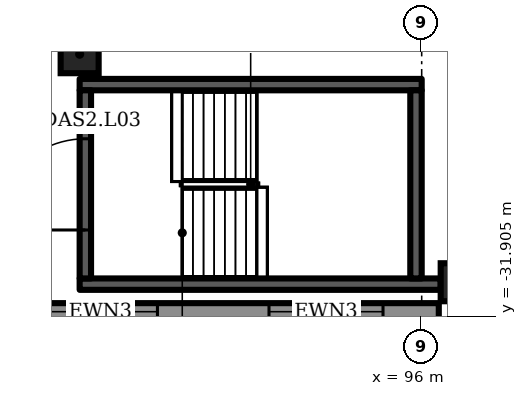
"""IFC4 building model, lengths in metres.
Left out: names, types, materials, properties, quantities, classifications, styles, units other than length and angle.
Written with IfcOpenShell. Run it as: python <this file> out.ifc"""

import sys

from ifc_helpers import new_model, si_unit, direction, frame, frame_2d, origin, origin_2d, place, context, subcontext, project, spatial, rectangle, extrude, element, fill, save


model = new_model("IFC4")
c1 = context("Model", 3, precision=1e-05, world=origin(), true_north=direction((0.0, 1.0)))
c2 = subcontext(c1, "Body", "Model", "MODEL_VIEW")
j1 = project(units=[si_unit("LENGTHUNIT", "METRE"), si_unit("PLANEANGLEUNIT", "RADIAN")], contexts=[c1])
p1 = place(None, origin())
s1 = spatial("IfcSite", under=j1, at=p1, CompositionType="ELEMENT")
p2 = place(p1, origin())
s2 = spatial("IfcBuilding", under=s1, at=p2, CompositionType="ELEMENT")
p3 = place(p2, frame((0.0, 0.0, 21.5)))
s3 = spatial("IfcBuildingStorey", under=s2, at=p3, CompositionType="ELEMENT", Elevation=21.5)
for number, where, z_axis, x_axis in (
    (1, (97.0, -31.0, 0.0), (0.0, 0.0, 1.0), (1.0, 0.0, 0.0)),
    (2, (87.0, -25.0, 0.0), (0.0, 0.0, 1.0), (1.0, 0.0, 0.0)),
):
    element("IfcColumn", number, at=place(p3, frame(where, z_axis=z_axis, x_axis=x_axis)), inside=s3, PredefinedType="COLUMN", context=c2, shape_type="SweptSolid", body=[
        extrude(rectangle(XDim=1.0, YDim=1.0, at=origin_2d()), origin(), (0.0, 0.0, 1.0), 6.0),
    ])
p4 = place(p3, frame((-4.45, -31.775, 0.0), z_axis=(0.0, 0.0, 1.0), x_axis=(1.0, 0.0, 0.0)))
e3 = element("IfcWall", 3, at=p4, inside=s3, PredefinedType="SOLIDWALL", context=c2, shape_type="SweptSolid", body=[
    extrude(rectangle(XDim=100.9, YDim=0.45, at=frame_2d((50.45, 0.0))), origin(), (0.0, 0.0, 1.0), 5.7),
])
p5 = place(p4, frame((1.468, 0.0, 1.0)))
e4 = element("IfcOpeningElement", 4, at=p5, cuts=e3, PredefinedType="OPENING", context=c2, shape_type="SweptSolid", body=[
    extrude(rectangle(XDim=3.0, YDim=3.7, at=frame_2d((1.5, 1.85))), frame((0.0, 0.235, 0.0), z_axis=(0.0, -1.0, 0.0), x_axis=(1.0, 0.0, 0.0)), (0.0, 0.0, 1.0), 0.47),
])
p6 = place(p4, frame((7.403, 0.0, 1.0)))
e5 = element("IfcOpeningElement", 5, at=p6, cuts=e3, PredefinedType="OPENING", context=c2, shape_type="SweptSolid", body=[
    extrude(rectangle(XDim=3.0, YDim=3.7, at=frame_2d((1.5, 1.85))), frame((0.0, 0.235, 0.0), z_axis=(0.0, -1.0, 0.0), x_axis=(1.0, 0.0, 0.0)), (0.0, 0.0, 1.0), 0.47),
])
p7 = place(p4, frame((13.338, 0.0, 1.0)))
e6 = element("IfcOpeningElement", 6, at=p7, cuts=e3, PredefinedType="OPENING", context=c2, shape_type="SweptSolid", body=[
    extrude(rectangle(XDim=3.0, YDim=3.7, at=frame_2d((1.5, 1.85))), frame((0.0, 0.235, 0.0), z_axis=(0.0, -1.0, 0.0), x_axis=(1.0, 0.0, 0.0)), (0.0, 0.0, 1.0), 0.47),
])
p8 = place(p4, frame((19.273, 0.0, 1.0)))
e7 = element("IfcOpeningElement", 7, at=p8, cuts=e3, PredefinedType="OPENING", context=c2, shape_type="SweptSolid", body=[
    extrude(rectangle(XDim=3.0, YDim=3.7, at=frame_2d((1.5, 1.85))), frame((0.0, 0.235, 0.0), z_axis=(0.0, -1.0, 0.0), x_axis=(1.0, 0.0, 0.0)), (0.0, 0.0, 1.0), 0.47),
])
p9 = place(p4, frame((25.209, 0.0, 1.0)))
e8 = element("IfcOpeningElement", 8, at=p9, cuts=e3, PredefinedType="OPENING", context=c2, shape_type="SweptSolid", body=[
    extrude(rectangle(XDim=3.0, YDim=3.7, at=frame_2d((1.5, 1.85))), frame((0.0, 0.235, 0.0), z_axis=(0.0, -1.0, 0.0), x_axis=(1.0, 0.0, 0.0)), (0.0, 0.0, 1.0), 0.47),
])
p10 = place(p4, frame((31.144, 0.0, 1.0)))
e9 = element("IfcOpeningElement", 9, at=p10, cuts=e3, PredefinedType="OPENING", context=c2, shape_type="SweptSolid", body=[
    extrude(rectangle(XDim=3.0, YDim=3.7, at=frame_2d((1.5, 1.85))), frame((0.0, 0.235, 0.0), z_axis=(0.0, -1.0, 0.0), x_axis=(1.0, 0.0, 0.0)), (0.0, 0.0, 1.0), 0.47),
])
p11 = place(p4, frame((37.079, 0.0, 1.0)))
e10 = element("IfcOpeningElement", 10, at=p11, cuts=e3, PredefinedType="OPENING", context=c2, shape_type="SweptSolid", body=[
    extrude(rectangle(XDim=3.0, YDim=3.7, at=frame_2d((1.5, 1.85))), frame((0.0, 0.235, 0.0), z_axis=(0.0, -1.0, 0.0), x_axis=(1.0, 0.0, 0.0)), (0.0, 0.0, 1.0), 0.47),
])
p12 = place(p4, frame((43.015, 0.0, 1.0)))
e11 = element("IfcOpeningElement", 11, at=p12, cuts=e3, PredefinedType="OPENING", context=c2, shape_type="SweptSolid", body=[
    extrude(rectangle(XDim=3.0, YDim=3.7, at=frame_2d((1.5, 1.85))), frame((0.0, 0.235, 0.0), z_axis=(0.0, -1.0, 0.0), x_axis=(1.0, 0.0, 0.0)), (0.0, 0.0, 1.0), 0.47),
])
p13 = place(p4, frame((48.95, 0.0, 1.0)))
e12 = element("IfcOpeningElement", 12, at=p13, cuts=e3, PredefinedType="OPENING", context=c2, shape_type="SweptSolid", body=[
    extrude(rectangle(XDim=3.0, YDim=3.7, at=frame_2d((1.5, 1.85))), frame((0.0, 0.235, 0.0), z_axis=(0.0, -1.0, 0.0), x_axis=(1.0, 0.0, 0.0)), (0.0, 0.0, 1.0), 0.47),
])
p14 = place(p4, frame((54.885, 0.0, 1.0)))
e13 = element("IfcOpeningElement", 13, at=p14, cuts=e3, PredefinedType="OPENING", context=c2, shape_type="SweptSolid", body=[
    extrude(rectangle(XDim=3.0, YDim=3.7, at=frame_2d((1.5, 1.85))), frame((0.0, 0.235, 0.0), z_axis=(0.0, -1.0, 0.0), x_axis=(1.0, 0.0, 0.0)), (0.0, 0.0, 1.0), 0.47),
])
p15 = place(p4, frame((60.821, 0.0, 1.0)))
e14 = element("IfcOpeningElement", 14, at=p15, cuts=e3, PredefinedType="OPENING", context=c2, shape_type="SweptSolid", body=[
    extrude(rectangle(XDim=3.0, YDim=3.7, at=frame_2d((1.5, 1.85))), frame((0.0, 0.235, 0.0), z_axis=(0.0, -1.0, 0.0), x_axis=(1.0, 0.0, 0.0)), (0.0, 0.0, 1.0), 0.47),
])
p16 = place(p4, frame((66.756, 0.0, 1.0)))
e15 = element("IfcOpeningElement", 15, at=p16, cuts=e3, PredefinedType="OPENING", context=c2, shape_type="SweptSolid", body=[
    extrude(rectangle(XDim=3.0, YDim=3.7, at=frame_2d((1.5, 1.85))), frame((0.0, 0.235, 0.0), z_axis=(0.0, -1.0, 0.0), x_axis=(1.0, 0.0, 0.0)), (0.0, 0.0, 1.0), 0.47),
])
p17 = place(p4, frame((72.691, 0.0, 1.0)))
e16 = element("IfcOpeningElement", 16, at=p17, cuts=e3, PredefinedType="OPENING", context=c2, shape_type="SweptSolid", body=[
    extrude(rectangle(XDim=3.0, YDim=3.7, at=frame_2d((1.5, 1.85))), frame((0.0, 0.235, 0.0), z_axis=(0.0, -1.0, 0.0), x_axis=(1.0, 0.0, 0.0)), (0.0, 0.0, 1.0), 0.47),
])
p18 = place(p4, frame((78.626, 0.0, 1.0)))
e17 = element("IfcOpeningElement", 17, at=p18, cuts=e3, PredefinedType="OPENING", context=c2, shape_type="SweptSolid", body=[
    extrude(rectangle(XDim=3.0, YDim=3.7, at=frame_2d((1.5, 1.85))), frame((0.0, 0.235, 0.0), z_axis=(0.0, -1.0, 0.0), x_axis=(1.0, 0.0, 0.0)), (0.0, 0.0, 1.0), 0.47),
])
p19 = place(p4, frame((84.562, 0.0, 1.0)))
e18 = element("IfcOpeningElement", 18, at=p19, cuts=e3, PredefinedType="OPENING", context=c2, shape_type="SweptSolid", body=[
    extrude(rectangle(XDim=3.0, YDim=3.7, at=frame_2d((1.5, 1.85))), frame((0.0, 0.235, 0.0), z_axis=(0.0, -1.0, 0.0), x_axis=(1.0, 0.0, 0.0)), (0.0, 0.0, 1.0), 0.47),
])
p20 = place(p4, frame((90.497, 0.0, 1.0)))
e19 = element("IfcOpeningElement", 19, at=p20, cuts=e3, PredefinedType="OPENING", context=c2, shape_type="SweptSolid", body=[
    extrude(rectangle(XDim=3.0, YDim=3.7, at=frame_2d((1.5, 1.85))), frame((0.0, 0.235, 0.0), z_axis=(0.0, -1.0, 0.0), x_axis=(1.0, 0.0, 0.0)), (0.0, 0.0, 1.0), 0.47),
])
p21 = place(p4, frame((96.432, 0.0, 1.0)))
e20 = element("IfcOpeningElement", 20, at=p21, cuts=e3, PredefinedType="OPENING", context=c2, shape_type="SweptSolid", body=[
    extrude(rectangle(XDim=3.0, YDim=3.7, at=frame_2d((1.5, 1.85))), frame((0.0, 0.235, 0.0), z_axis=(0.0, -1.0, 0.0), x_axis=(1.0, 0.0, 0.0)), (0.0, 0.0, 1.0), 0.47),
])
p22 = place(p3, frame((87.0, -31.05, 0.0), z_axis=(0.0, 0.0, 1.0), x_axis=(1.0, 0.0, 0.0)))
e21 = element("IfcWall", 21, at=p22, inside=s3, PredefinedType="SHEAR", context=c2, shape_type="SweptSolid", body=[
    extrude(rectangle(XDim=9.5, YDim=0.3, at=frame_2d((4.75, 0.0))), origin(), (0.0, 0.0, 1.0), 5.7),
])
p23 = place(p3, frame((87.0, -25.8, 0.0), z_axis=(0.0, 0.0, 1.0), x_axis=(1.0, 0.0, 0.0)))
e22 = element("IfcWall", 22, at=p23, inside=s3, PredefinedType="SHEAR", context=c2, shape_type="SweptSolid", body=[
    extrude(rectangle(XDim=9.0, YDim=0.3, at=frame_2d((4.5, 0.0))), origin(), (0.0, 0.0, 1.0), 5.7),
])
p24 = place(p3, frame((87.15, -30.9, 0.0), z_axis=(0.0, 0.0, 1.0), x_axis=(0.0, 1.0, 0.0)))
e23 = element("IfcWall", 23, at=p24, inside=s3, PredefinedType="SHEAR", context=c2, shape_type="SweptSolid", body=[
    extrude(rectangle(XDim=4.95, YDim=0.3, at=frame_2d((2.475, 0.0))), origin(), (0.0, 0.0, 1.0), 5.7),
])
p25 = place(p24, frame((1.275, 0.0, 0.0)))
e24 = element("IfcOpeningElement", 24, at=p25, cuts=e23, PredefinedType="OPENING", context=c2, shape_type="SweptSolid", body=[
    extrude(rectangle(XDim=2.4, YDim=2.1, at=frame_2d((1.2, 1.05))), frame((0.0, 0.16, 0.0), z_axis=(0.0, -1.0, 0.0), x_axis=(1.0, 0.0, 0.0)), (0.0, 0.0, 1.0), 0.32),
])
p26 = place(p3, frame((95.85, -30.9, 0.0), z_axis=(0.0, 0.0, 1.0), x_axis=(0.0, 1.0, 0.0)))
e25 = element("IfcWall", 25, at=p26, inside=s3, PredefinedType="SHEAR", context=c2, shape_type="SweptSolid", body=[
    extrude(rectangle(XDim=4.95, YDim=0.3, at=frame_2d((2.475, 0.0))), origin(), (0.0, 0.0, 1.0), 5.7),
])
p27 = place(p20, origin())
e26 = element("IfcWindow", 26, at=p27, inside=s3, PartitioningType="SINGLE_PANEL", PredefinedType="WINDOW", context=c2, shape_type="SweptSolid", body=[
    extrude(rectangle(XDim=3.0, YDim=3.7, at=frame_2d((1.5, 1.85))), frame((0.0, 0.105, 0.0), z_axis=(0.0, -1.0, 0.0), x_axis=(1.0, 0.0, 0.0)), (0.0, 0.0, 1.0), 0.06),
])
fill(e19, e26)
p28 = place(p21, origin())
e27 = element("IfcWindow", 27, at=p28, inside=s3, PartitioningType="SINGLE_PANEL", PredefinedType="WINDOW", context=c2, shape_type="SweptSolid", body=[
    extrude(rectangle(XDim=3.0, YDim=3.7, at=frame_2d((1.5, 1.85))), frame((0.0, 0.105, 0.0), z_axis=(0.0, -1.0, 0.0), x_axis=(1.0, 0.0, 0.0)), (0.0, 0.0, 1.0), 0.06),
])
fill(e20, e27)
p29 = place(p25, origin())
e28 = element("IfcDoor", 28, at=p29, inside=s3, OperationType="DOUBLE_DOOR_SINGLE_SWING", PredefinedType="DOOR", context=c2, shape_type="SweptSolid", body=[
    extrude(rectangle(XDim=2.4, YDim=2.1, at=frame_2d((1.2, 1.05))), frame((0.0, 0.025, 0.0), z_axis=(0.0, -1.0, 0.0), x_axis=(1.0, 0.0, 0.0)), (0.0, 0.0, 1.0), 0.05),
])
fill(e24, e28)
save(model, sys.argv[1])
